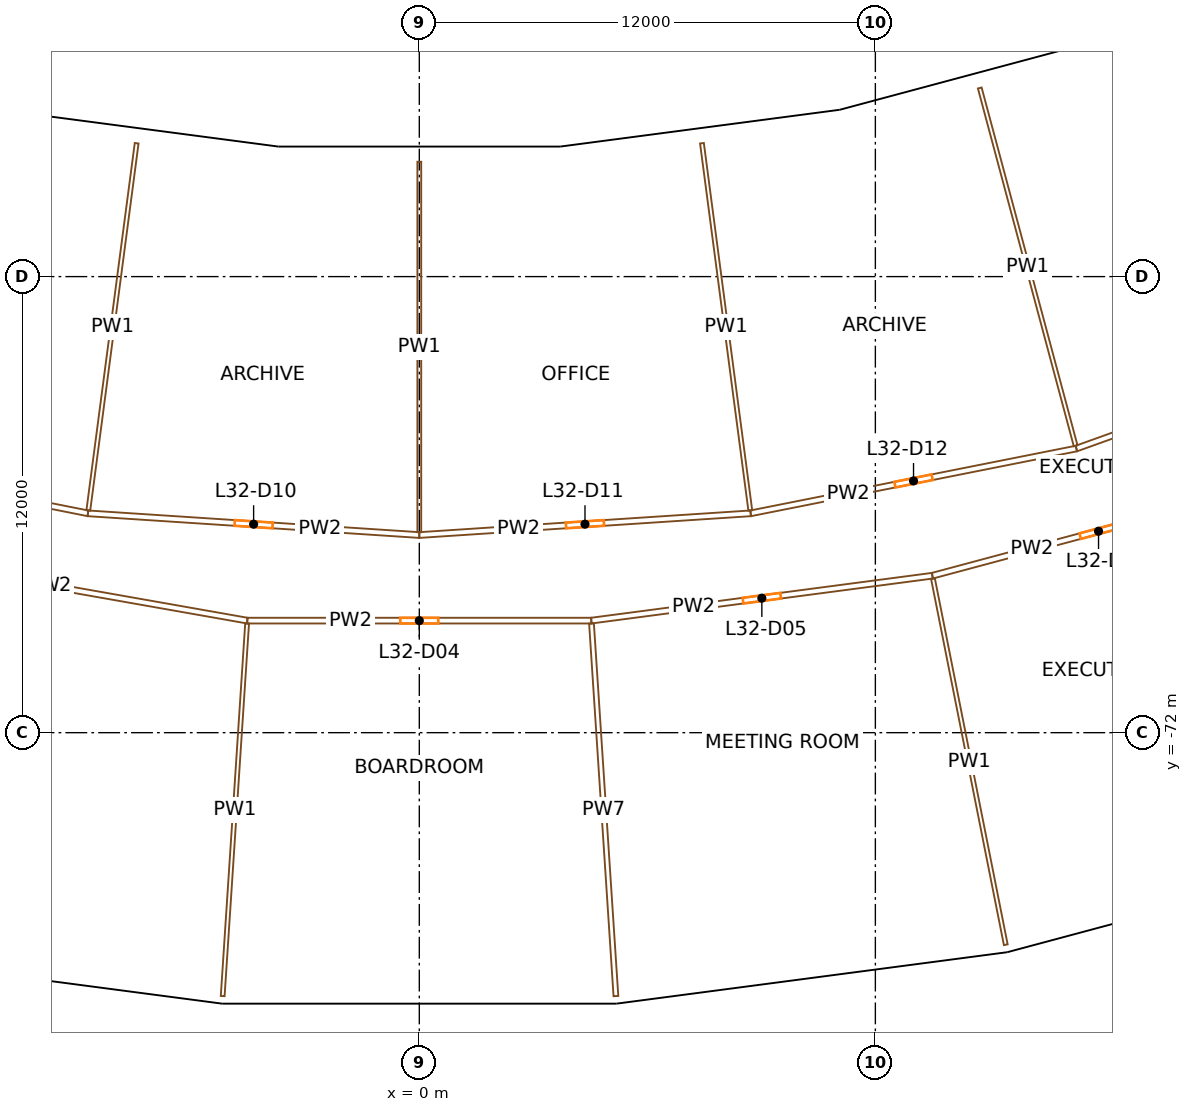
"""IFC4 building model, lengths in metres.
Left out: names, types, materials, properties, quantities, classifications, styles, units other than length and angle.
Written with IfcOpenShell. Run it as: python <this file> out.ifc"""

import sys

from ifc_helpers import new_model, si_unit, direction, frame, frame_2d, origin, origin_2d, place, context, subcontext, project, spatial, rectangle, extrude, element, fill, save


model = new_model("IFC4")
c1 = context("Model", 3, precision=1e-05, world=origin(), true_north=direction((0.0, 1.0)))
c2 = subcontext(c1, "Body", "Model", "MODEL_VIEW")
j1 = project(units=[si_unit("LENGTHUNIT", "METRE"), si_unit("PLANEANGLEUNIT", "RADIAN")], contexts=[c1])
p1 = place(None, origin())
s1 = spatial("IfcSite", under=j1, at=p1, CompositionType="ELEMENT")
p2 = place(p1, origin())
s2 = spatial("IfcBuilding", under=s1, at=p2, CompositionType="ELEMENT")
p3 = place(p2, frame((0.0, 0.0, 140.5)))
s3 = spatial("IfcBuildingStorey", under=s2, at=p3, CompositionType="ELEMENT", Elevation=140.5)
for number, where, z_axis, x_axis in (
    (1, (-3.81, -58.125, 0.0), (0.0, 0.0, 1.0), (0.998, -0.065, 0.0)),
    (2, (-5.085, -77.583, 0.0), (0.0, 0.0, 1.0), (0.998, -0.065, 0.0)),
    (3, (3.81, -58.125, 0.0), (0.0, 0.0, 1.0), (0.998, 0.065, 0.0)),
    (4, (5.085, -77.583, 0.0), (0.0, 0.0, 1.0), (0.998, 0.065, 0.0)),
    (5, (11.364, -57.131, 0.0), (0.0, 0.0, 1.0), (0.981, 0.195, 0.0)),
    (6, (15.168, -76.256, 0.0), (0.0, 0.0, 1.0), (0.981, 0.195, 0.0)),
    (7, (18.724, -55.159, 0.0), (0.0, 0.0, 1.0), (0.947, 0.321, 0.0)),
):
    element("IfcColumn", number, at=place(p3, frame(where, z_axis=z_axis, x_axis=x_axis)), inside=s3, PredefinedType="COLUMN", context=c2, shape_type="SweptSolid", body=[
        extrude(rectangle(XDim=1.2, YDim=1.5, at=origin_2d()), origin(), (0.0, 0.0, 1.0), 3.8),
    ])
p4 = place(p3, frame((11.125, -55.804, 0.0), z_axis=(0.0, 0.0, 1.0), x_axis=(-0.991444533306, -0.130528684121, 0.0)))
e8 = element("IfcWall", 8, at=p4, inside=s3, PredefinedType="SOLIDWALL", context=c2, shape_type="SweptSolid", body=[
    extrude(rectangle(XDim=7.493, YDim=0.4, at=frame_2d((3.747, 0.0))), origin(), (0.0, 0.0, 1.0), 2.7),
])
p5 = place(p4, frame((4.301, 0.0, 0.9)))
e9 = element("IfcOpeningElement", 9, at=p5, cuts=e8, PredefinedType="OPENING", context=c2, shape_type="SweptSolid", body=[
    extrude(rectangle(XDim=2.6, YDim=1.65, at=frame_2d((1.3, 0.825))), frame((0.0, 0.21, 0.0), z_axis=(0.0, -1.0, 0.0), x_axis=(1.0, 0.0, 0.0)), (0.0, 0.0, 1.0), 0.42),
])
p6 = place(p4, frame((0.592, 0.0, 0.9)))
e10 = element("IfcOpeningElement", 10, at=p6, cuts=e8, PredefinedType="OPENING", context=c2, shape_type="SweptSolid", body=[
    extrude(rectangle(XDim=2.6, YDim=1.65, at=frame_2d((1.3, 0.825))), frame((0.0, 0.21, 0.0), z_axis=(0.0, -1.0, 0.0), x_axis=(1.0, 0.0, 0.0)), (0.0, 0.0, 1.0), 0.42),
])
p7 = place(p3, frame((18.241, -53.894, 0.0), z_axis=(0.0, 0.0, 1.0), x_axis=(-0.965924597867, -0.258823629594, 0.0)))
e11 = element("IfcWall", 11, at=p7, inside=s3, PredefinedType="SOLIDWALL", context=c2, shape_type="SweptSolid", body=[
    extrude(rectangle(XDim=7.342, YDim=0.4, at=frame_2d((3.671, 0.0))), origin(), (0.0, 0.0, 1.0), 2.7),
])
p8 = place(p7, frame((4.225, 0.0, 0.9)))
e12 = element("IfcOpeningElement", 12, at=p8, cuts=e11, PredefinedType="OPENING", context=c2, shape_type="SweptSolid", body=[
    extrude(rectangle(XDim=2.6, YDim=1.65, at=frame_2d((1.3, 0.825))), frame((0.0, 0.21, 0.0), z_axis=(0.0, -1.0, 0.0), x_axis=(1.0, 0.0, 0.0)), (0.0, 0.0, 1.0), 0.42),
])
p9 = place(p7, frame((0.517, 0.0, 0.9)))
e13 = element("IfcOpeningElement", 13, at=p9, cuts=e11, PredefinedType="OPENING", context=c2, shape_type="SweptSolid", body=[
    extrude(rectangle(XDim=2.6, YDim=1.65, at=frame_2d((1.3, 0.825))), frame((0.0, 0.21, 0.0), z_axis=(0.0, -1.0, 0.0), x_axis=(1.0, 0.0, 0.0)), (0.0, 0.0, 1.0), 0.42),
])
p10 = place(p3, frame((-3.697, -56.782, 0.0), z_axis=(0.0, 0.0, 1.0), x_axis=(-0.991444533306, 0.130528684121, 0.0)))
e14 = element("IfcWall", 14, at=p10, inside=s3, PredefinedType="SOLIDWALL", context=c2, shape_type="SweptSolid", body=[
    extrude(rectangle(XDim=7.493, YDim=0.4, at=frame_2d((3.747, 0.0))), origin(), (0.0, 0.0, 1.0), 2.7),
])
p11 = place(p10, frame((4.301, 0.0, 0.9)))
e15 = element("IfcOpeningElement", 15, at=p11, cuts=e14, PredefinedType="OPENING", context=c2, shape_type="SweptSolid", body=[
    extrude(rectangle(XDim=2.6, YDim=1.65, at=frame_2d((1.3, 0.825))), frame((0.0, 0.21, 0.0), z_axis=(0.0, -1.0, 0.0), x_axis=(1.0, 0.0, 0.0)), (0.0, 0.0, 1.0), 0.42),
])
p12 = place(p10, frame((0.592, 0.0, 0.9)))
e16 = element("IfcOpeningElement", 16, at=p12, cuts=e14, PredefinedType="OPENING", context=c2, shape_type="SweptSolid", body=[
    extrude(rectangle(XDim=2.6, YDim=1.65, at=frame_2d((1.3, 0.825))), frame((0.0, 0.21, 0.0), z_axis=(0.0, -1.0, 0.0), x_axis=(1.0, 0.0, 0.0)), (0.0, 0.0, 1.0), 0.42),
])
p13 = place(p3, frame((3.671, -56.779, 0.0), z_axis=(0.0, 0.0, 1.0), x_axis=(-1.0, 0.0, 0.0)))
e17 = element("IfcWall", 17, at=p13, inside=s3, PredefinedType="SOLIDWALL", context=c2, shape_type="SweptSolid", body=[
    extrude(rectangle(XDim=7.341, YDim=0.4, at=frame_2d((3.671, 0.0))), origin(), (0.0, 0.0, 1.0), 2.7),
])
p14 = place(p13, frame((4.225, 0.0, 0.9)))
e18 = element("IfcOpeningElement", 18, at=p14, cuts=e17, PredefinedType="OPENING", context=c2, shape_type="SweptSolid", body=[
    extrude(rectangle(XDim=2.6, YDim=1.65, at=frame_2d((1.3, 0.825))), frame((0.0, 0.21, 0.0), z_axis=(0.0, -1.0, 0.0), x_axis=(1.0, 0.0, 0.0)), (0.0, 0.0, 1.0), 0.42),
])
p15 = place(p13, frame((0.517, 0.0, 0.9)))
e19 = element("IfcOpeningElement", 19, at=p15, cuts=e17, PredefinedType="OPENING", context=c2, shape_type="SweptSolid", body=[
    extrude(rectangle(XDim=2.6, YDim=1.65, at=frame_2d((1.3, 0.825))), frame((0.0, 0.21, 0.0), z_axis=(0.0, -1.0, 0.0), x_axis=(1.0, 0.0, 0.0)), (0.0, 0.0, 1.0), 0.42),
])
p16 = place(p3, frame((-4.526, -69.052, 0.0), z_axis=(0.0, 0.0, 1.0), x_axis=(-0.984805080703, 0.173663332402, 0.0)))
e20 = element("IfcWall", 20, at=p16, inside=s3, PredefinedType="PARTITIONING", context=c2, shape_type="SweptSolid", body=[
    extrude(rectangle(XDim=15.069, YDim=0.15, at=frame_2d((7.535, 0.0))), origin(), (0.0, 0.0, 1.0), 2.4),
])
p17 = place(p16, frame((6.635, 0.0, 0.0)))
e21 = element("IfcOpeningElement", 21, at=p17, cuts=e20, PredefinedType="OPENING", context=c2, shape_type="SweptSolid", body=[
    extrude(rectangle(XDim=1.8, YDim=2.1, at=frame_2d((0.9, 1.05))), frame((0.0, 0.085, 0.0), z_axis=(0.0, -1.0, 0.0), x_axis=(1.0, 0.0, 0.0)), (0.0, 0.0, 1.0), 0.17),
])
p18 = place(p3, frame((-17.289, -64.524, 0.0), z_axis=(0.0, 0.0, 1.0), x_axis=(0.980786466832, -0.195084357342, 0.0)))
e22 = element("IfcWall", 22, at=p18, inside=s3, PredefinedType="PARTITIONING", context=c2, shape_type="SweptSolid", body=[
    extrude(rectangle(XDim=8.738, YDim=0.15, at=frame_2d((4.369, 0.0))), origin(), (0.0, 0.0, 1.0), 2.4),
])
p19 = place(p18, frame((3.869, 0.0, 0.0)))
e23 = element("IfcOpeningElement", 23, at=p19, cuts=e22, PredefinedType="OPENING", context=c2, shape_type="SweptSolid", body=[
    extrude(rectangle(XDim=1.0, YDim=2.1, at=frame_2d((0.5, 1.05))), frame((0.0, 0.085, 0.0), z_axis=(0.0, -1.0, 0.0), x_axis=(1.0, 0.0, 0.0)), (0.0, 0.0, 1.0), 0.17),
])
p20 = place(p3, frame((-8.719, -66.229, 0.0), z_axis=(0.0, 0.0, 1.0), x_axis=(0.997858593599, -0.065408158359, 0.0)))
e24 = element("IfcWall", 24, at=p20, inside=s3, PredefinedType="PARTITIONING", context=c2, shape_type="SweptSolid", body=[
    extrude(rectangle(XDim=8.738, YDim=0.15, at=frame_2d((4.369, 0.0))), origin(), (0.0, 0.0, 1.0), 2.4),
])
p21 = place(p20, frame((3.869, 0.0, 0.0)))
e25 = element("IfcOpeningElement", 25, at=p21, cuts=e24, PredefinedType="OPENING", context=c2, shape_type="SweptSolid", body=[
    extrude(rectangle(XDim=1.0, YDim=2.1, at=frame_2d((0.5, 1.05))), frame((0.0, 0.085, 0.0), z_axis=(0.0, -1.0, 0.0), x_axis=(1.0, 0.0, 0.0)), (0.0, 0.0, 1.0), 0.17),
])
p22 = place(p3, frame((-7.437, -56.491, 0.0), z_axis=(0.0, 0.0, 1.0), x_axis=(-0.13053421433, -0.99144380521, 0.0)))
e26 = element("IfcWall", 26, at=p22, inside=s3, PredefinedType="PARTITIONING", context=c2, shape_type="SweptSolid", body=[
    extrude(rectangle(XDim=9.746, YDim=0.1, at=frame_2d((4.873, 0.0))), origin(), (0.0, 0.0, 1.0), 2.4),
])
p23 = place(p3, frame((-5.173, -78.931, 0.0), z_axis=(0.0, 0.0, 1.0), x_axis=(0.065402415744, 0.997858970003, 0.0)))
e27 = element("IfcWall", 27, at=p23, inside=s3, PredefinedType="PARTITIONING", context=c2, shape_type="SweptSolid", body=[
    extrude(rectangle(XDim=9.825, YDim=0.1, at=frame_2d((4.913, 0.0))), origin(), (0.0, 0.0, 1.0), 2.4),
])
p24 = place(p3, frame((4.526, -69.052, 0.0), z_axis=(0.0, 0.0, 1.0), x_axis=(-1.0, 0.0, 0.0)))
e28 = element("IfcWall", 28, at=p24, inside=s3, PredefinedType="PARTITIONING", context=c2, shape_type="SweptSolid", body=[
    extrude(rectangle(XDim=9.052, YDim=0.15, at=frame_2d((4.526, 0.0))), origin(), (0.0, 0.0, 1.0), 2.4),
])
p25 = place(p24, frame((4.026, 0.0, 0.0)))
e29 = element("IfcOpeningElement", 29, at=p25, cuts=e28, PredefinedType="OPENING", context=c2, shape_type="SweptSolid", body=[
    extrude(rectangle(XDim=1.0, YDim=2.1, at=frame_2d((0.5, 1.05))), frame((0.0, 0.085, 0.0), z_axis=(0.0, -1.0, 0.0), x_axis=(1.0, 0.0, 0.0)), (0.0, 0.0, 1.0), 0.17),
])
p26 = place(p3, frame((0.0, -66.8, 0.0), z_axis=(0.0, 0.0, 1.0), x_axis=(0.997858593599, 0.065408158359, 0.0)))
e30 = element("IfcWall", 30, at=p26, inside=s3, PredefinedType="PARTITIONING", context=c2, shape_type="SweptSolid", body=[
    extrude(rectangle(XDim=8.738, YDim=0.15, at=frame_2d((4.369, 0.0))), origin(), (0.0, 0.0, 1.0), 2.4),
])
p27 = place(p26, frame((3.869, 0.0, 0.0)))
e31 = element("IfcOpeningElement", 31, at=p27, cuts=e30, PredefinedType="OPENING", context=c2, shape_type="SweptSolid", body=[
    extrude(rectangle(XDim=1.0, YDim=2.1, at=frame_2d((0.5, 1.05))), frame((0.0, 0.085, 0.0), z_axis=(0.0, -1.0, 0.0), x_axis=(1.0, 0.0, 0.0)), (0.0, 0.0, 1.0), 0.17),
])
p28 = place(p3, frame((0.0, -56.979, 0.0), z_axis=(0.0, 0.0, 1.0), x_axis=(0.0, -1.0, 0.0)))
e32 = element("IfcWall", 32, at=p28, inside=s3, PredefinedType="PARTITIONING", context=c2, shape_type="SweptSolid", body=[
    extrude(rectangle(XDim=9.747, YDim=0.1, at=frame_2d((4.873, 0.0))), origin(), (0.0, 0.0, 1.0), 2.4),
])
p29 = place(p3, frame((13.5, -67.87, 0.0), z_axis=(0.0, 0.0, 1.0), x_axis=(-0.991446306881, -0.13051521203, 0.0)))
e33 = element("IfcWall", 33, at=p29, inside=s3, PredefinedType="PARTITIONING", context=c2, shape_type="SweptSolid", body=[
    extrude(rectangle(XDim=9.052, YDim=0.15, at=frame_2d((4.526, 0.0))), origin(), (0.0, 0.0, 1.0), 2.4),
])
p30 = place(p29, frame((4.026, 0.0, 0.0)))
e34 = element("IfcOpeningElement", 34, at=p30, cuts=e33, PredefinedType="OPENING", context=c2, shape_type="SweptSolid", body=[
    extrude(rectangle(XDim=1.0, YDim=2.1, at=frame_2d((0.5, 1.05))), frame((0.0, 0.085, 0.0), z_axis=(0.0, -1.0, 0.0), x_axis=(1.0, 0.0, 0.0)), (0.0, 0.0, 1.0), 0.17),
])
p31 = place(p3, frame((5.173, -78.931, 0.0), z_axis=(0.0, 0.0, 1.0), x_axis=(-0.065402415744, 0.997858970003, 0.0)))
e35 = element("IfcWall", 35, at=p31, inside=s3, PredefinedType="MOVABLE", context=c2, shape_type="SweptSolid", body=[
    extrude(rectangle(XDim=9.825, YDim=0.125, at=frame_2d((4.913, 0.0))), origin(), (0.0, 0.0, 1.0), 2.4),
])
p32 = place(p3, frame((7.437, -56.491, 0.0), z_axis=(0.0, 0.0, 1.0), x_axis=(0.13053421433, -0.99144380521, 0.0)))
e36 = element("IfcWall", 36, at=p32, inside=s3, PredefinedType="PARTITIONING", context=c2, shape_type="SweptSolid", body=[
    extrude(rectangle(XDim=9.746, YDim=0.1, at=frame_2d((4.873, 0.0))), origin(), (0.0, 0.0, 1.0), 2.4),
])
p33 = place(p3, frame((8.719, -66.229, 0.0), z_axis=(0.0, 0.0, 1.0), x_axis=(0.980786466832, 0.195084357342, 0.0)))
e37 = element("IfcWall", 37, at=p33, inside=s3, PredefinedType="PARTITIONING", context=c2, shape_type="SweptSolid", body=[
    extrude(rectangle(XDim=8.738, YDim=0.15, at=frame_2d((4.369, 0.0))), origin(), (0.0, 0.0, 1.0), 2.4),
])
p34 = place(p33, frame((3.869, 0.0, 0.0)))
e38 = element("IfcOpeningElement", 38, at=p34, cuts=e37, PredefinedType="OPENING", context=c2, shape_type="SweptSolid", body=[
    extrude(rectangle(XDim=1.0, YDim=2.1, at=frame_2d((0.5, 1.05))), frame((0.0, 0.085, 0.0), z_axis=(0.0, -1.0, 0.0), x_axis=(1.0, 0.0, 0.0)), (0.0, 0.0, 1.0), 0.17),
])
p35 = place(p3, frame((22.244, -65.528, 0.0), z_axis=(0.0, 0.0, 1.0), x_axis=(-0.965926260719, -0.258817423781, 0.0)))
e39 = element("IfcWall", 39, at=p35, inside=s3, PredefinedType="PARTITIONING", context=c2, shape_type="SweptSolid", body=[
    extrude(rectangle(XDim=9.052, YDim=0.15, at=frame_2d((4.526, 0.0))), origin(), (0.0, 0.0, 1.0), 2.4),
])
p36 = place(p35, frame((4.026, 0.0, 0.0)))
e40 = element("IfcOpeningElement", 40, at=p36, cuts=e39, PredefinedType="OPENING", context=c2, shape_type="SweptSolid", body=[
    extrude(rectangle(XDim=1.0, YDim=2.1, at=frame_2d((0.5, 1.05))), frame((0.0, 0.085, 0.0), z_axis=(0.0, -1.0, 0.0), x_axis=(1.0, 0.0, 0.0)), (0.0, 0.0, 1.0), 0.17),
])
p37 = place(p3, frame((14.747, -55.037, 0.0), z_axis=(0.0, 0.0, 1.0), x_axis=(0.258833329344, -0.965921998725, 0.0)))
e41 = element("IfcWall", 41, at=p37, inside=s3, PredefinedType="PARTITIONING", context=c2, shape_type="SweptSolid", body=[
    extrude(rectangle(XDim=9.746, YDim=0.1, at=frame_2d((4.873, 0.0))), origin(), (0.0, 0.0, 1.0), 2.4),
])
p38 = place(p3, frame((15.432, -77.58, 0.0), z_axis=(0.0, 0.0, 1.0), x_axis=(-0.195088621536, 0.980785618648, 0.0)))
e42 = element("IfcWall", 42, at=p38, inside=s3, PredefinedType="PARTITIONING", context=c2, shape_type="SweptSolid", body=[
    extrude(rectangle(XDim=9.825, YDim=0.1, at=frame_2d((4.913, 0.0))), origin(), (0.0, 0.0, 1.0), 2.4),
])
p39 = place(p3, frame((17.289, -64.524, 0.0), z_axis=(0.0, 0.0, 1.0), x_axis=(0.941150861554, 0.337986768669, 0.0)))
e43 = element("IfcWall", 43, at=p39, inside=s3, PredefinedType="PARTITIONING", context=c2, shape_type="SweptSolid", body=[
    extrude(rectangle(XDim=10.998, YDim=0.15, at=frame_2d((5.499, 0.0))), origin(), (0.0, 0.0, 1.0), 2.4),
])
p40 = place(p39, frame((4.999, 0.0, 0.0)))
e44 = element("IfcOpeningElement", 44, at=p40, cuts=e43, PredefinedType="OPENING", context=c2, shape_type="SweptSolid", body=[
    extrude(rectangle(XDim=1.0, YDim=2.1, at=frame_2d((0.5, 1.05))), frame((0.0, 0.085, 0.0), z_axis=(0.0, -1.0, 0.0), x_axis=(1.0, 0.0, 0.0)), (0.0, 0.0, 1.0), 0.17),
])
p41 = place(p11, origin())
e45 = element("IfcWindow", 45, at=p41, inside=s3, PartitioningType="SINGLE_PANEL", PredefinedType="WINDOW", context=c2, shape_type="SweptSolid", body=[
    extrude(rectangle(XDim=2.6, YDim=1.65, at=frame_2d((1.3, 0.825))), frame((0.0, 0.03, 0.0), z_axis=(0.0, -1.0, 0.0), x_axis=(1.0, 0.0, 0.0)), (0.0, 0.0, 1.0), 0.06),
])
fill(e15, e45)
p42 = place(p12, origin())
e46 = element("IfcWindow", 46, at=p42, inside=s3, PartitioningType="SINGLE_PANEL", PredefinedType="WINDOW", context=c2, shape_type="SweptSolid", body=[
    extrude(rectangle(XDim=2.6, YDim=1.65, at=frame_2d((1.3, 0.825))), frame((0.0, 0.03, 0.0), z_axis=(0.0, -1.0, 0.0), x_axis=(1.0, 0.0, 0.0)), (0.0, 0.0, 1.0), 0.06),
])
fill(e16, e46)
p43 = place(p14, origin())
e47 = element("IfcWindow", 47, at=p43, inside=s3, PartitioningType="SINGLE_PANEL", PredefinedType="WINDOW", context=c2, shape_type="SweptSolid", body=[
    extrude(rectangle(XDim=2.6, YDim=1.65, at=frame_2d((1.3, 0.825))), frame((0.0, 0.03, 0.0), z_axis=(0.0, -1.0, 0.0), x_axis=(1.0, 0.0, 0.0)), (0.0, 0.0, 1.0), 0.06),
])
fill(e18, e47)
p44 = place(p15, origin())
e48 = element("IfcWindow", 48, at=p44, inside=s3, PartitioningType="SINGLE_PANEL", PredefinedType="WINDOW", context=c2, shape_type="SweptSolid", body=[
    extrude(rectangle(XDim=2.6, YDim=1.65, at=frame_2d((1.3, 0.825))), frame((0.0, 0.03, 0.0), z_axis=(0.0, -1.0, 0.0), x_axis=(1.0, 0.0, 0.0)), (0.0, 0.0, 1.0), 0.06),
])
fill(e19, e48)
p45 = place(p5, origin())
e49 = element("IfcWindow", 49, at=p45, inside=s3, PartitioningType="SINGLE_PANEL", PredefinedType="WINDOW", context=c2, shape_type="SweptSolid", body=[
    extrude(rectangle(XDim=2.6, YDim=1.65, at=frame_2d((1.3, 0.825))), frame((0.0, 0.03, 0.0), z_axis=(0.0, -1.0, 0.0), x_axis=(1.0, 0.0, 0.0)), (0.0, 0.0, 1.0), 0.06),
])
fill(e9, e49)
p46 = place(p6, origin())
e50 = element("IfcWindow", 50, at=p46, inside=s3, PartitioningType="SINGLE_PANEL", PredefinedType="WINDOW", context=c2, shape_type="SweptSolid", body=[
    extrude(rectangle(XDim=2.6, YDim=1.65, at=frame_2d((1.3, 0.825))), frame((0.0, 0.03, 0.0), z_axis=(0.0, -1.0, 0.0), x_axis=(1.0, 0.0, 0.0)), (0.0, 0.0, 1.0), 0.06),
])
fill(e10, e50)
p47 = place(p8, origin())
e51 = element("IfcWindow", 51, at=p47, inside=s3, PartitioningType="SINGLE_PANEL", PredefinedType="WINDOW", context=c2, shape_type="SweptSolid", body=[
    extrude(rectangle(XDim=2.6, YDim=1.65, at=frame_2d((1.3, 0.825))), frame((0.0, 0.03, 0.0), z_axis=(0.0, -1.0, 0.0), x_axis=(1.0, 0.0, 0.0)), (0.0, 0.0, 1.0), 0.06),
])
fill(e12, e51)
p48 = place(p9, origin())
e52 = element("IfcWindow", 52, at=p48, inside=s3, PartitioningType="SINGLE_PANEL", PredefinedType="WINDOW", context=c2, shape_type="SweptSolid", body=[
    extrude(rectangle(XDim=2.6, YDim=1.65, at=frame_2d((1.3, 0.825))), frame((0.0, 0.03, 0.0), z_axis=(0.0, -1.0, 0.0), x_axis=(1.0, 0.0, 0.0)), (0.0, 0.0, 1.0), 0.06),
])
fill(e13, e52)
p49 = place(p25, origin())
e53 = element("IfcDoor", 53, at=p49, inside=s3, OperationType="SINGLE_SWING_RIGHT", PredefinedType="DOOR", context=c2, shape_type="SweptSolid", body=[
    extrude(rectangle(XDim=1.0, YDim=2.1, at=frame_2d((0.5, 1.05))), frame((0.0, 0.025, 0.0), z_axis=(0.0, -1.0, 0.0), x_axis=(1.0, 0.0, 0.0)), (0.0, 0.0, 1.0), 0.05),
])
fill(e29, e53)
p50 = place(p30, origin())
e54 = element("IfcDoor", 54, at=p50, inside=s3, OperationType="SINGLE_SWING_RIGHT", PredefinedType="DOOR", context=c2, shape_type="SweptSolid", body=[
    extrude(rectangle(XDim=1.0, YDim=2.1, at=frame_2d((0.5, 1.05))), frame((0.0, 0.025, 0.0), z_axis=(0.0, -1.0, 0.0), x_axis=(1.0, 0.0, 0.0)), (0.0, 0.0, 1.0), 0.05),
])
fill(e34, e54)
p51 = place(p36, origin())
e55 = element("IfcDoor", 55, at=p51, inside=s3, OperationType="SINGLE_SWING_RIGHT", PredefinedType="DOOR", context=c2, shape_type="SweptSolid", body=[
    extrude(rectangle(XDim=1.0, YDim=2.1, at=frame_2d((0.5, 1.05))), frame((0.0, 0.025, 0.0), z_axis=(0.0, -1.0, 0.0), x_axis=(1.0, 0.0, 0.0)), (0.0, 0.0, 1.0), 0.05),
])
fill(e40, e55)
p52 = place(p21, origin())
e56 = element("IfcDoor", 56, at=p52, inside=s3, OperationType="SINGLE_SWING_RIGHT", PredefinedType="DOOR", context=c2, shape_type="SweptSolid", body=[
    extrude(rectangle(XDim=1.0, YDim=2.1, at=frame_2d((0.5, 1.05))), frame((0.0, 0.025, 0.0), z_axis=(0.0, -1.0, 0.0), x_axis=(1.0, 0.0, 0.0)), (0.0, 0.0, 1.0), 0.05),
])
fill(e25, e56)
p53 = place(p27, origin())
e57 = element("IfcDoor", 57, at=p53, inside=s3, OperationType="SINGLE_SWING_RIGHT", PredefinedType="DOOR", context=c2, shape_type="SweptSolid", body=[
    extrude(rectangle(XDim=1.0, YDim=2.1, at=frame_2d((0.5, 1.05))), frame((0.0, 0.025, 0.0), z_axis=(0.0, -1.0, 0.0), x_axis=(1.0, 0.0, 0.0)), (0.0, 0.0, 1.0), 0.05),
])
fill(e31, e57)
p54 = place(p34, origin())
e58 = element("IfcDoor", 58, at=p54, inside=s3, OperationType="SINGLE_SWING_RIGHT", PredefinedType="DOOR", context=c2, shape_type="SweptSolid", body=[
    extrude(rectangle(XDim=1.0, YDim=2.1, at=frame_2d((0.5, 1.05))), frame((0.0, 0.025, 0.0), z_axis=(0.0, -1.0, 0.0), x_axis=(1.0, 0.0, 0.0)), (0.0, 0.0, 1.0), 0.05),
])
fill(e38, e58)
save(model, sys.argv[1])
